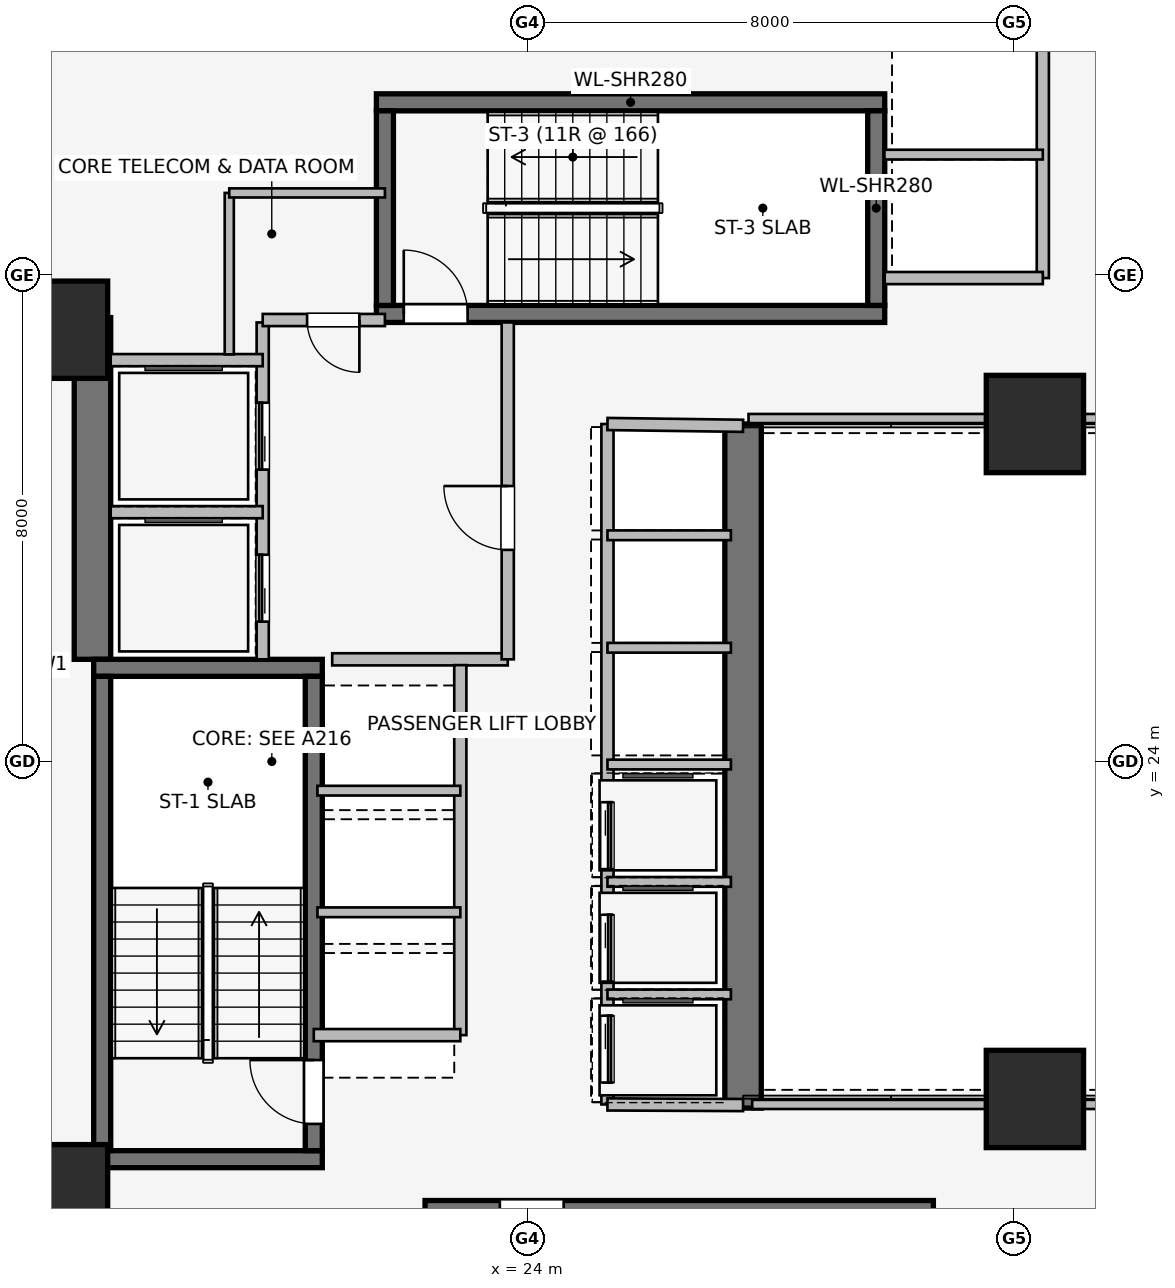
"""IFC4 building model, lengths in metres.
Left out: names, types, materials, properties, quantities, classifications, styles, units other than length and angle.
Written with IfcOpenShell. Run it as: python <this file> out.ifc"""

import sys

from ifc_helpers import new_model, si_unit, direction, frame, frame_2d, origin, origin_2d, place, context, subcontext, project, spatial, rectangle, extrude, element, fill, save


model = new_model("IFC4")
c1 = context("Model", 3, precision=1e-05, world=origin(), true_north=direction((0.0, 1.0)))
c2 = subcontext(c1, "Body", "Model", "MODEL_VIEW")
j1 = project(units=[si_unit("LENGTHUNIT", "METRE"), si_unit("PLANEANGLEUNIT", "RADIAN")], contexts=[c1])
p1 = place(None, origin())
s1 = spatial("IfcSite", under=j1, at=p1, CompositionType="ELEMENT")
p2 = place(p1, origin())
s2 = spatial("IfcBuilding", under=s1, at=p2, CompositionType="ELEMENT")
p3 = place(p2, frame((0.0, 0.0, 56.2)))
s3 = spatial("IfcBuildingStorey", under=s2, at=p3, CompositionType="ELEMENT", Elevation=56.2)
p4 = place(p3, frame((16.85, 25.68, 0.0), z_axis=(0.0, 0.0, 1.0), x_axis=(0.0, 1.0, 0.0)))
e1 = element("IfcWall", 1, at=p4, inside=s3, PredefinedType="SHEAR", context=c2, shape_type="SweptSolid", body=[
    extrude(rectangle(XDim=5.62, YDim=0.6, at=frame_2d((2.81, 0.0))), origin(), (0.0, 0.0, 1.0), 3.65),
])
p5 = place(p3, frame((27.55, 29.55, 0.0), z_axis=(0.0, 0.0, 1.0), x_axis=(0.0, -1.0, 0.0)))
e2 = element("IfcWall", 2, at=p5, inside=s3, PredefinedType="SHEAR", context=c2, shape_type="SweptSolid", body=[
    extrude(rectangle(XDim=11.25, YDim=0.6, at=frame_2d((5.625, 0.0))), origin(), (0.0, 0.0, 1.0), 3.65),
])
for number, where, z_axis, x_axis in (
    (3, (16.87, 17.46, 0.0), (0.0, 0.0, 1.0), (1.0, 0.0, 0.0)),
    (4, (20.63, 25.54, 0.0), (0.0, 0.0, 1.0), (-1.0, 0.0, 0.0)),
):
    element("IfcWall", number, at=place(p3, frame(where, z_axis=z_axis, x_axis=x_axis)), inside=s3, PredefinedType="SHEAR", context=c2, shape_type="SweptSolid", body=[
        extrude(rectangle(XDim=3.76, YDim=0.28, at=frame_2d((1.88, 0.0))), origin(), (0.0, 0.0, 1.0), 3.65),
    ])
p6 = place(p3, frame((17.01, 25.4, 0.0), z_axis=(0.0, 0.0, 1.0), x_axis=(0.0, -1.0, 0.0)))
e5 = element("IfcWall", 5, at=p6, inside=s3, PredefinedType="SHEAR", context=c2, shape_type="SweptSolid", body=[
    extrude(rectangle(XDim=7.8, YDim=0.28, at=frame_2d((3.9, 0.0))), origin(), (0.0, 0.0, 1.0), 3.65),
])
p7 = place(p3, frame((20.49, 17.6, 0.0), z_axis=(0.0, 0.0, 1.0), x_axis=(0.0, 1.0, 0.0)))
e6 = element("IfcWall", 6, at=p7, inside=s3, PredefinedType="SHEAR", context=c2, shape_type="SweptSolid", body=[
    extrude(rectangle(XDim=7.8, YDim=0.28, at=frame_2d((3.9, 0.0))), origin(), (0.0, 0.0, 1.0), 3.65),
])
p8 = place(p7, frame((0.44, 0.0, 0.0)))
e7 = element("IfcOpeningElement", 7, at=p8, cuts=e6, PredefinedType="OPENING", context=c2, shape_type="SweptSolid", body=[
    extrude(rectangle(XDim=1.05, YDim=2.0, at=frame_2d((0.525, 1.0))), frame((0.0, 0.15, 0.0), z_axis=(0.0, -1.0, 0.0), x_axis=(1.0, 0.0, 0.0)), (0.0, 0.0, 1.0), 0.3),
])
p9 = place(p3, frame((30.68, 16.64, 0.0), z_axis=(0.0, 0.0, 1.0), x_axis=(-1.0, 0.0, 0.0)))
e8 = element("IfcWall", 8, at=p9, inside=s3, PredefinedType="SHEAR", context=c2, shape_type="SweptSolid", body=[
    extrude(rectangle(XDim=8.36, YDim=0.28, at=frame_2d((4.18, 0.0))), origin(), (0.0, 0.0, 1.0), 3.65),
])
p10 = place(p9, frame((6.08, 0.0, 0.0)))
e9 = element("IfcOpeningElement", 9, at=p10, cuts=e8, PredefinedType="OPENING", context=c2, shape_type="SweptSolid", body=[
    extrude(rectangle(XDim=1.05, YDim=2.0, at=frame_2d((0.525, 1.0))), frame((0.0, 0.15, 0.0), z_axis=(0.0, -1.0, 0.0), x_axis=(1.0, 0.0, 0.0)), (0.0, 0.0, 1.0), 0.3),
])
p11 = place(p3, frame((21.52, 31.36, 0.0), z_axis=(0.0, 0.0, 1.0), x_axis=(1.0, 0.0, 0.0)))
e10 = element("IfcWall", 10, at=p11, inside=s3, PredefinedType="SHEAR", context=c2, shape_type="SweptSolid", body=[
    extrude(rectangle(XDim=8.36, YDim=0.28, at=frame_2d((4.18, 0.0))), origin(), (0.0, 0.0, 1.0), 3.65),
])
p12 = place(p11, frame((0.45, 0.0, 0.0)))
e11 = element("IfcOpeningElement", 11, at=p12, cuts=e10, PredefinedType="OPENING", context=c2, shape_type="SweptSolid", body=[
    extrude(rectangle(XDim=1.05, YDim=2.0, at=frame_2d((0.525, 1.0))), frame((0.0, 0.15, 0.0), z_axis=(0.0, -1.0, 0.0), x_axis=(1.0, 0.0, 0.0)), (0.0, 0.0, 1.0), 0.3),
])
p13 = place(p3, frame((29.88, 34.84, 0.0), z_axis=(0.0, 0.0, 1.0), x_axis=(-1.0, 0.0, 0.0)))
e12 = element("IfcWall", 12, at=p13, inside=s3, PredefinedType="SHEAR", context=c2, shape_type="SweptSolid", body=[
    extrude(rectangle(XDim=8.36, YDim=0.28, at=frame_2d((4.18, 0.0))), origin(), (0.0, 0.0, 1.0), 3.65),
])
for number, where, z_axis, x_axis in (
    (13, (21.66, 34.7, 0.0), (0.0, 0.0, 1.0), (0.0, -1.0, 0.0)),
    (14, (29.74, 31.5, 0.0), (0.0, 0.0, 1.0), (0.0, 1.0, 0.0)),
):
    element("IfcWall", number, at=place(p3, frame(where, z_axis=z_axis, x_axis=x_axis)), inside=s3, PredefinedType="SHEAR", context=c2, shape_type="SweptSolid", body=[
        extrude(rectangle(XDim=3.2, YDim=0.28, at=frame_2d((1.6, 0.0))), origin(), (0.0, 0.0, 1.0), 3.65),
    ])
for number, where, z_axis, x_axis in (
    (15, (16.3, 16.9, 0.0), (0.0, 0.0, 1.0), (1.0, 0.0, 0.0)),
    (16, (16.3, 31.1, 0.0), (0.0, 0.0, 1.0), (1.0, 0.0, 0.0)),
    (17, (32.35, 18.45, 0.0), (0.0, 0.0, 1.0), (1.0, 0.0, 0.0)),
    (18, (32.35, 29.55, 0.0), (0.0, 0.0, 1.0), (1.0, 0.0, 0.0)),
):
    element("IfcColumn", number, at=place(p3, frame(where, z_axis=z_axis, x_axis=x_axis)), inside=s3, PredefinedType="COLUMN", context=c2, shape_type="SweptSolid", body=[
        extrude(rectangle(XDim=1.6, YDim=1.6, at=origin_2d()), origin(), (0.0, 0.0, 1.0), 3.65),
    ])
p14 = place(p3, frame((19.65, 25.68, 0.0), z_axis=(0.0, 0.0, 1.0), x_axis=(0.0, 1.0, 0.0)))
e19 = element("IfcWall", 19, at=p14, inside=s3, PredefinedType="PARTITIONING", context=c2, shape_type="SweptSolid", body=[
    extrude(rectangle(XDim=5.54, YDim=0.2, at=frame_2d((2.77, 0.0))), origin(), (0.0, 0.0, 1.0), 3.36),
])
p15 = place(p14, frame((0.62, 0.0, 0.0)))
e20 = element("IfcOpeningElement", 20, at=p15, cuts=e19, PredefinedType="OPENING", context=c2, shape_type="SweptSolid", body=[
    extrude(rectangle(XDim=1.1, YDim=2.2, at=frame_2d((0.55, 1.1))), frame((0.0, 0.11, 0.0), z_axis=(0.0, -1.0, 0.0), x_axis=(1.0, 0.0, 0.0)), (0.0, 0.0, 1.0), 0.22),
])
p16 = place(p14, frame((3.12, 0.0, 0.0)))
e21 = element("IfcOpeningElement", 21, at=p16, cuts=e19, PredefinedType="OPENING", context=c2, shape_type="SweptSolid", body=[
    extrude(rectangle(XDim=1.1, YDim=2.2, at=frame_2d((0.55, 1.1))), frame((0.0, 0.11, 0.0), z_axis=(0.0, -1.0, 0.0), x_axis=(1.0, 0.0, 0.0)), (0.0, 0.0, 1.0), 0.22),
])
p17 = place(p3, frame((20.793, 25.68, 0.0), z_axis=(0.0, 0.0, 1.0), x_axis=(1.0, 0.0, 0.0)))
e22 = element("IfcWall", 22, at=p17, inside=s3, PredefinedType="PARTITIONING", context=c2, shape_type="SweptSolid", body=[
    extrude(rectangle(XDim=2.887, YDim=0.2, at=frame_2d((1.443, 0.0))), origin(), (0.0, 0.0, 1.0), 3.36),
])
p18 = place(p3, frame((23.68, 25.68, 0.0), z_axis=(0.0, 0.0, 1.0), x_axis=(0.0, 1.0, 0.0)))
e23 = element("IfcWall", 23, at=p18, inside=s3, PredefinedType="PARTITIONING", context=c2, shape_type="SweptSolid", body=[
    extrude(rectangle(XDim=5.54, YDim=0.2, at=frame_2d((2.77, 0.0))), origin(), (0.0, 0.0, 1.0), 3.36),
])
p19 = place(p18, frame((1.8, 0.0, 0.0)))
e24 = element("IfcOpeningElement", 24, at=p19, cuts=e23, PredefinedType="OPENING", context=c2, shape_type="SweptSolid", body=[
    extrude(rectangle(XDim=1.05, YDim=2.0, at=frame_2d((0.525, 1.0))), frame((0.0, 0.11, 0.0), z_axis=(0.0, -1.0, 0.0), x_axis=(1.0, 0.0, 0.0)), (0.0, 0.0, 1.0), 0.22),
])
p20 = place(p3, frame((21.66, 31.26, 0.0), z_axis=(0.0, 0.0, 1.0), x_axis=(-1.0, 0.0, 0.0)))
e25 = element("IfcWall", 25, at=p20, inside=s3, PredefinedType="PARTITIONING", context=c2, shape_type="SweptSolid", body=[
    extrude(rectangle(XDim=2.01, YDim=0.2, at=frame_2d((1.005, 0.0))), origin(), (0.0, 0.0, 1.0), 3.36),
])
p21 = place(p20, frame((0.42, 0.0, 0.0)))
e26 = element("IfcOpeningElement", 26, at=p21, cuts=e25, PredefinedType="OPENING", context=c2, shape_type="SweptSolid", body=[
    extrude(rectangle(XDim=0.86, YDim=2.0, at=frame_2d((0.43, 1.0))), frame((0.0, 0.11, 0.0), z_axis=(0.0, -1.0, 0.0), x_axis=(1.0, 0.0, 0.0)), (0.0, 0.0, 1.0), 0.22),
])
p22 = place(p3, frame((17.15, 28.1, 0.0), z_axis=(0.0, 0.0, 1.0), x_axis=(1.0, 0.0, 0.0)))
e27 = element("IfcWall", 27, at=p22, inside=s3, PredefinedType="PARTITIONING", context=c2, shape_type="SweptSolid", body=[
    extrude(rectangle(XDim=2.5, YDim=0.2, at=frame_2d((1.25, 0.0))), origin(), (0.0, 0.0, 1.0), 3.36),
])
p23 = place(p3, frame((19.65, 30.6, 0.0), z_axis=(0.0, 0.0, 1.0), x_axis=(-1.0, 0.0, 0.0)))
e28 = element("IfcWall", 28, at=p23, inside=s3, PredefinedType="PARTITIONING", context=c2, shape_type="SweptSolid", body=[
    extrude(rectangle(XDim=2.5, YDim=0.2, at=frame_2d((1.25, 0.0))), origin(), (0.0, 0.0, 1.0), 2.26),
])
p24 = place(p3, frame((32.48, 31.95, 0.0), z_axis=(0.0, 0.0, 1.0), x_axis=(0.0, 1.0, 0.0)))
e29 = element("IfcWall", 29, at=p24, inside=s3, PredefinedType="PARTITIONING", context=c2, shape_type="SweptSolid", body=[
    extrude(rectangle(XDim=4.05, YDim=0.2, at=frame_2d((2.025, 0.0))), origin(), (0.0, 0.0, 1.0), 2.483),
])
p25 = place(p3, frame((32.48, 31.95, 0.0), z_axis=(0.0, 0.0, 1.0), x_axis=(-1.0, 0.0, 0.0)))
e30 = element("IfcWall", 30, at=p25, inside=s3, PredefinedType="PARTITIONING", context=c2, shape_type="SweptSolid", body=[
    extrude(rectangle(XDim=2.6, YDim=0.2, at=frame_2d((1.3, 0.0))), origin(), (0.0, 0.0, 1.0), 3.36),
])
p26 = place(p3, frame((29.875, 33.98, 0.0), z_axis=(0.0, 0.0, 1.0), x_axis=(1.0, 0.0, 0.0)))
e31 = element("IfcWall", 31, at=p26, inside=s3, PredefinedType="PARTITIONING", context=c2, shape_type="SweptSolid", body=[
    extrude(rectangle(XDim=2.605, YDim=0.16, at=frame_2d((1.302, 0.0))), origin(), (0.0, 0.0, 1.0), 3.36),
])
p27 = place(p3, frame((22.9, 19.5, 0.0), z_axis=(0.0, 0.0, 1.0), x_axis=(0.0, 1.0, 0.0)))
e32 = element("IfcWall", 32, at=p27, inside=s3, PredefinedType="PARTITIONING", context=c2, shape_type="SweptSolid", body=[
    extrude(rectangle(XDim=6.085, YDim=0.2, at=frame_2d((3.042, 0.0))), origin(), (0.0, 0.0, 1.0), 3.36),
])
p28 = place(p3, frame((20.49, 19.5, 0.0), z_axis=(0.0, 0.0, 1.0), x_axis=(1.0, 0.0, 0.0)))
e33 = element("IfcWall", 33, at=p28, inside=s3, PredefinedType="PARTITIONING", context=c2, shape_type="SweptSolid", body=[
    extrude(rectangle(XDim=2.41, YDim=0.2, at=frame_2d((1.205, 0.0))), origin(), (0.0, 0.0, 1.0), 2.26),
])
for number, where, z_axis, x_axis in (
    (34, (20.55, 21.52, 0.0), (0.0, 0.0, 1.0), (1.0, 0.0, 0.0)),
    (35, (20.55, 23.52, 0.0), (0.0, 0.0, 1.0), (1.0, 0.0, 0.0)),
):
    element("IfcWall", number, at=place(p3, frame(where, z_axis=z_axis, x_axis=x_axis)), inside=s3, PredefinedType="PARTITIONING", context=c2, shape_type="SweptSolid", body=[
        extrude(rectangle(XDim=2.35, YDim=0.16, at=frame_2d((1.175, 0.0))), origin(), (0.0, 0.0, 1.0), 3.36),
    ])
p29 = place(p3, frame((25.32, 29.55, 0.0), z_axis=(0.0, 0.0, 1.0), x_axis=(0.0, -1.0, 0.0)))
e36 = element("IfcWall", 36, at=p29, inside=s3, PredefinedType="PARTITIONING", context=c2, shape_type="SweptSolid", body=[
    extrude(rectangle(XDim=11.19, YDim=0.2, at=frame_2d((5.595, 0.0))), origin(), (0.0, 0.0, 1.0), 3.36),
])
p30 = place(p29, frame((6.22, 0.0, 0.0)))
e37 = element("IfcOpeningElement", 37, at=p30, cuts=e36, PredefinedType="OPENING", context=c2, shape_type="SweptSolid", body=[
    extrude(rectangle(XDim=1.1, YDim=2.2, at=frame_2d((0.55, 1.1))), frame((0.0, 0.11, 0.0), z_axis=(0.0, -1.0, 0.0), x_axis=(1.0, 0.0, 0.0)), (0.0, 0.0, 1.0), 0.22),
])
p31 = place(p29, frame((8.07, 0.0, 0.0)))
e38 = element("IfcOpeningElement", 38, at=p31, cuts=e36, PredefinedType="OPENING", context=c2, shape_type="SweptSolid", body=[
    extrude(rectangle(XDim=1.1, YDim=2.2, at=frame_2d((0.55, 1.1))), frame((0.0, 0.11, 0.0), z_axis=(0.0, -1.0, 0.0), x_axis=(1.0, 0.0, 0.0)), (0.0, 0.0, 1.0), 0.22),
])
p32 = place(p29, frame((9.73, 0.0, 0.0)))
e39 = element("IfcOpeningElement", 39, at=p32, cuts=e36, PredefinedType="OPENING", context=c2, shape_type="SweptSolid", body=[
    extrude(rectangle(XDim=1.1, YDim=2.2, at=frame_2d((0.55, 1.1))), frame((0.0, 0.11, 0.0), z_axis=(0.0, -1.0, 0.0), x_axis=(1.0, 0.0, 0.0)), (0.0, 0.0, 1.0), 0.22),
])
p33 = place(p3, frame((25.32, 18.36, 0.0), z_axis=(0.0, 0.0, 1.0), x_axis=(0.999989925833, -0.004488678231, 0.0)))
e40 = element("IfcWall", 40, at=p33, inside=s3, PredefinedType="PARTITIONING", context=c2, shape_type="SweptSolid", body=[
    extrude(rectangle(XDim=2.23, YDim=0.2, at=frame_2d((1.115, 0.0))), origin(), (0.0, 0.0, 1.0), 3.36),
])
p34 = place(p3, frame((27.55, 29.52, 0.0), z_axis=(0.0, 0.0, 1.0), x_axis=(-0.999909343457, 0.013464949556, 0.0)))
e41 = element("IfcWall", 41, at=p34, inside=s3, PredefinedType="PARTITIONING", context=c2, shape_type="SweptSolid", body=[
    extrude(rectangle(XDim=2.23, YDim=0.2, at=frame_2d((1.115, 0.0))), origin(), (0.0, 0.0, 1.0), 2.26),
])
for number, where, z_axis, x_axis in (
    (42, (25.32, 20.17, 0.0), (0.0, 0.0, 1.0), (1.0, 0.0, 0.0)),
    (43, (25.32, 22.02, 0.0), (0.0, 0.0, 1.0), (1.0, 0.0, 0.0)),
    (44, (25.32, 23.95, 0.0), (0.0, 0.0, 1.0), (1.0, 0.0, 0.0)),
    (45, (25.32, 25.87, 0.0), (0.0, 0.0, 1.0), (1.0, 0.0, 0.0)),
    (46, (25.32, 27.72, 0.0), (0.0, 0.0, 1.0), (1.0, 0.0, 0.0)),
):
    element("IfcWall", number, at=place(p3, frame(where, z_axis=z_axis, x_axis=x_axis)), inside=s3, PredefinedType="PARTITIONING", context=c2, shape_type="SweptSolid", body=[
        extrude(rectangle(XDim=2.03, YDim=0.16, at=frame_2d((1.015, 0.0))), origin(), (0.0, 0.0, 1.0), 3.36),
    ])
p35 = place(p3, frame((19.1, 33.35, 0.0), z_axis=(0.0, 0.0, 1.0), x_axis=(0.0, -1.0, 0.0)))
e47 = element("IfcWall", 47, at=p35, inside=s3, PredefinedType="PARTITIONING", context=c2, shape_type="SweptSolid", body=[
    extrude(rectangle(XDim=2.655, YDim=0.15, at=frame_2d((1.328, 0.0))), origin(), (0.0, 0.0, 1.0), 3.36),
])
p36 = place(p3, frame((21.66, 33.35, 0.0), z_axis=(0.0, 0.0, 1.0), x_axis=(-1.0, 0.0, 0.0)))
e48 = element("IfcWall", 48, at=p36, inside=s3, PredefinedType="PARTITIONING", context=c2, shape_type="SweptSolid", body=[
    extrude(rectangle(XDim=2.56, YDim=0.15, at=frame_2d((1.28, 0.0))), origin(), (0.0, 0.0, 1.0), 3.36),
])
p37 = place(p3, frame((27.7, 18.36, 0.0), z_axis=(0.0, 0.0, 1.0), x_axis=(1.0, 0.0, 0.0)))
e49 = element("IfcWall", 49, at=p37, inside=s3, PredefinedType="PARTITIONING", context=c2, shape_type="SweptSolid", body=[
    extrude(rectangle(XDim=12.14, YDim=0.15, at=frame_2d((6.07, 0.0))), origin(), (0.0, 0.0, 1.0), 2.501),
])
p38 = place(p3, frame((39.84, 29.64, 0.0), z_axis=(0.0, 0.0, 1.0), x_axis=(-1.0, 0.0, 0.0)))
e50 = element("IfcWall", 50, at=p38, inside=s3, PredefinedType="PARTITIONING", context=c2, shape_type="SweptSolid", body=[
    extrude(rectangle(XDim=12.2, YDim=0.15, at=frame_2d((6.1, 0.0))), origin(), (0.0, 0.0, 1.0), 2.501),
])
p39 = place(p8, origin())
e51 = element("IfcDoor", 51, at=p39, inside=s3, OperationType="SINGLE_SWING_RIGHT", PredefinedType="DOOR", context=c2, shape_type="SweptSolid", body=[
    extrude(rectangle(XDim=1.05, YDim=2.0, at=frame_2d((0.525, 1.0))), frame((0.0, 0.025, 0.0), z_axis=(0.0, -1.0, 0.0), x_axis=(1.0, 0.0, 0.0)), (0.0, 0.0, 1.0), 0.05),
])
fill(e7, e51)
p40 = place(p10, origin())
e52 = element("IfcDoor", 52, at=p40, inside=s3, OperationType="SINGLE_SWING_RIGHT", PredefinedType="DOOR", context=c2, shape_type="SweptSolid", body=[
    extrude(rectangle(XDim=1.05, YDim=2.0, at=frame_2d((0.525, 1.0))), frame((0.0, 0.025, 0.0), z_axis=(0.0, -1.0, 0.0), x_axis=(1.0, 0.0, 0.0)), (0.0, 0.0, 1.0), 0.05),
])
fill(e9, e52)
p41 = place(p12, origin())
e53 = element("IfcDoor", 53, at=p41, inside=s3, OperationType="SINGLE_SWING_LEFT", PredefinedType="DOOR", context=c2, shape_type="SweptSolid", body=[
    extrude(rectangle(XDim=1.05, YDim=2.0, at=frame_2d((0.525, 1.0))), frame((0.0, 0.025, 0.0), z_axis=(0.0, -1.0, 0.0), x_axis=(1.0, 0.0, 0.0)), (0.0, 0.0, 1.0), 0.05),
])
fill(e11, e53)
p42 = place(p15, origin())
e54 = element("IfcDoor", 54, at=p42, inside=s3, OperationType="SLIDING_TO_LEFT", PredefinedType="DOOR", context=c2, shape_type="SweptSolid", body=[
    extrude(rectangle(XDim=1.1, YDim=2.2, at=frame_2d((0.55, 1.1))), frame((0.0, 0.025, 0.0), z_axis=(0.0, -1.0, 0.0), x_axis=(1.0, 0.0, 0.0)), (0.0, 0.0, 1.0), 0.05),
])
fill(e20, e54)
p43 = place(p16, origin())
e55 = element("IfcDoor", 55, at=p43, inside=s3, OperationType="SLIDING_TO_LEFT", PredefinedType="DOOR", context=c2, shape_type="SweptSolid", body=[
    extrude(rectangle(XDim=1.1, YDim=2.2, at=frame_2d((0.55, 1.1))), frame((0.0, 0.025, 0.0), z_axis=(0.0, -1.0, 0.0), x_axis=(1.0, 0.0, 0.0)), (0.0, 0.0, 1.0), 0.05),
])
fill(e21, e55)
p44 = place(p19, origin())
e56 = element("IfcDoor", 56, at=p44, inside=s3, OperationType="SINGLE_SWING_RIGHT", PredefinedType="DOOR", context=c2, shape_type="SweptSolid", body=[
    extrude(rectangle(XDim=1.05, YDim=2.0, at=frame_2d((0.525, 1.0))), frame((0.0, 0.025, 0.0), z_axis=(0.0, -1.0, 0.0), x_axis=(1.0, 0.0, 0.0)), (0.0, 0.0, 1.0), 0.05),
])
fill(e24, e56)
p45 = place(p21, origin())
e57 = element("IfcDoor", 57, at=p45, inside=s3, OperationType="SINGLE_SWING_LEFT", PredefinedType="DOOR", context=c2, shape_type="SweptSolid", body=[
    extrude(rectangle(XDim=0.86, YDim=2.0, at=frame_2d((0.43, 1.0))), frame((0.0, 0.025, 0.0), z_axis=(0.0, -1.0, 0.0), x_axis=(1.0, 0.0, 0.0)), (0.0, 0.0, 1.0), 0.05),
])
fill(e26, e57)
p46 = place(p30, origin())
e58 = element("IfcDoor", 58, at=p46, inside=s3, OperationType="SLIDING_TO_LEFT", PredefinedType="DOOR", context=c2, shape_type="SweptSolid", body=[
    extrude(rectangle(XDim=1.1, YDim=2.2, at=frame_2d((0.55, 1.1))), frame((0.0, 0.025, 0.0), z_axis=(0.0, -1.0, 0.0), x_axis=(1.0, 0.0, 0.0)), (0.0, 0.0, 1.0), 0.05),
])
fill(e37, e58)
p47 = place(p31, origin())
e59 = element("IfcDoor", 59, at=p47, inside=s3, OperationType="SLIDING_TO_LEFT", PredefinedType="DOOR", context=c2, shape_type="SweptSolid", body=[
    extrude(rectangle(XDim=1.1, YDim=2.2, at=frame_2d((0.55, 1.1))), frame((0.0, 0.025, 0.0), z_axis=(0.0, -1.0, 0.0), x_axis=(1.0, 0.0, 0.0)), (0.0, 0.0, 1.0), 0.05),
])
fill(e38, e59)
p48 = place(p32, origin())
e60 = element("IfcDoor", 60, at=p48, inside=s3, OperationType="SLIDING_TO_LEFT", PredefinedType="DOOR", context=c2, shape_type="SweptSolid", body=[
    extrude(rectangle(XDim=1.1, YDim=2.2, at=frame_2d((0.55, 1.1))), frame((0.0, 0.025, 0.0), z_axis=(0.0, -1.0, 0.0), x_axis=(1.0, 0.0, 0.0)), (0.0, 0.0, 1.0), 0.05),
])
fill(e39, e60)
save(model, sys.argv[1])
